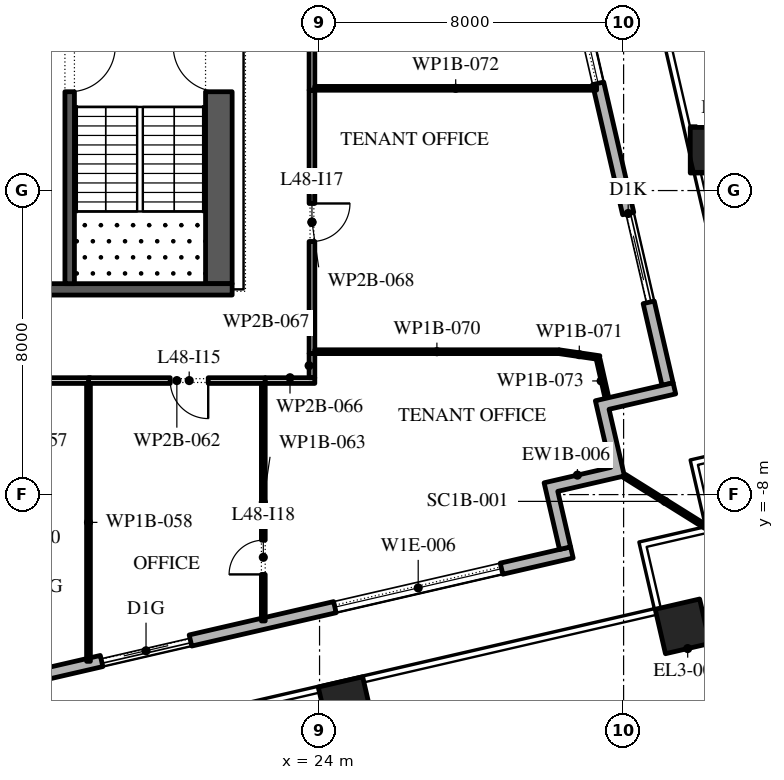
"""IFC4 building model, lengths in metres.
Left out: names, types, materials, properties, quantities, classifications, styles, units other than length and angle.
Written with IfcOpenShell. Run it as: python <this file> out.ifc"""

import sys

from ifc_helpers import new_model, si_unit, direction, frame, frame_2d, origin, origin_2d, place, context, subcontext, project, spatial, polyline, rectangle, outline, extrude, element, fill, save


model = new_model("IFC4")
c1 = context("Model", 3, precision=1e-05, world=origin(), true_north=direction((0.0, 1.0)))
c2 = subcontext(c1, "Body", "Model", "MODEL_VIEW")
j1 = project(units=[si_unit("LENGTHUNIT", "METRE"), si_unit("PLANEANGLEUNIT", "RADIAN")], contexts=[c1])
p1 = place(None, origin())
s1 = spatial("IfcSite", under=j1, at=p1, CompositionType="ELEMENT")
p2 = place(p1, origin())
s2 = spatial("IfcBuilding", under=s1, at=p2, CompositionType="ELEMENT")
p3 = place(p2, frame((0.0, 0.0, 217.8)))
s3 = spatial("IfcBuildingStorey", under=s2, at=p3, CompositionType="ELEMENT", Elevation=217.8)
for number, where, z_axis, x_axis in (
    (1, (24.685, -13.514, 0.0), (0.0, 0.0, 1.0), (0.974, 0.225, 0.0)),
    (2, (33.551, -11.467, 0.0), (0.0, 0.0, 1.0), (0.974, 0.225, 0.0)),
):
    element("IfcColumn", number, at=place(p3, frame(where, z_axis=z_axis, x_axis=x_axis)), inside=s3, PredefinedType="COLUMN", context=c2, shape_type="SweptSolid", body=[
        extrude(rectangle(XDim=1.2, YDim=1.2, at=origin_2d()), origin(), (0.0, 0.0, 1.0), 4.2),
    ])
p4 = place(p3, frame((34.354, 1.061, 0.0), z_axis=(-0.00267375834, 0.011741286623, 0.999927493974), x_axis=(-0.975037935076, -0.222038341651, 0.0)))
e3 = element("IfcColumn", 3, at=p4, inside=s3, PredefinedType="COLUMN", context=c2, shape_type="SweptSolid", body=[
    extrude(rectangle(XDim=1.2, YDim=1.2, at=origin_2d()), origin(), (0.0, 0.0, 1.0), 4.2),
])
p5 = place(p3, frame((-17.592, -20.657, 0.0), z_axis=(0.0, 0.0, 1.0), x_axis=(0.974370243697, 0.224950279389, 0.0)))
e4 = element("IfcWall", 4, at=p5, inside=s3, PredefinedType="STANDARD", context=c2, shape_type="SweptSolid", body=[
    extrude(rectangle(XDim=49.5, YDim=0.3, at=frame_2d((24.75, 0.0))), origin(), (0.0, 0.0, 1.0), 3.95),
])
p6 = place(p5, frame((2.8, 0.0, 0.0)))
e5 = element("IfcOpeningElement", 5, at=p6, cuts=e4, PredefinedType="OPENING", context=c2, shape_type="SweptSolid", body=[
    extrude(rectangle(XDim=2.4, YDim=2.85, at=frame_2d((1.2, 1.425))), frame((0.0, 0.16, 0.0), z_axis=(0.0, -1.0, 0.0), x_axis=(1.0, 0.0, 0.0)), (0.0, 0.0, 1.0), 0.32),
])
p7 = place(p5, frame((9.9, 0.0, 0.45)))
e6 = element("IfcOpeningElement", 6, at=p7, cuts=e4, PredefinedType="OPENING", context=c2, shape_type="SweptSolid", body=[
    extrude(rectangle(XDim=4.5, YDim=3.05, at=frame_2d((2.25, 1.525))), frame((0.0, 0.16, 0.0), z_axis=(0.0, -1.0, 0.0), x_axis=(1.0, 0.0, 0.0)), (0.0, 0.0, 1.0), 0.32),
])
p8 = place(p5, frame((18.2, 0.0, 0.45)))
e7 = element("IfcOpeningElement", 7, at=p8, cuts=e4, PredefinedType="OPENING", context=c2, shape_type="SweptSolid", body=[
    extrude(rectangle(XDim=4.5, YDim=2.625, at=frame_2d((2.25, 1.312))), frame((0.0, 0.16, 0.0), z_axis=(0.0, -1.0, 0.0), x_axis=(1.0, 0.0, 0.0)), (0.0, 0.0, 1.0), 0.32),
])
p9 = place(p5, frame((26.5, 0.0, 0.45)))
e8 = element("IfcOpeningElement", 8, at=p9, cuts=e4, PredefinedType="OPENING", context=c2, shape_type="SweptSolid", body=[
    extrude(rectangle(XDim=4.5, YDim=3.05, at=frame_2d((2.25, 1.525))), frame((0.0, 0.16, 0.0), z_axis=(0.0, -1.0, 0.0), x_axis=(1.0, 0.0, 0.0)), (0.0, 0.0, 1.0), 0.32),
])
p10 = place(p5, frame((36.8, 0.0, 0.0)))
e9 = element("IfcOpeningElement", 9, at=p10, cuts=e4, PredefinedType="OPENING", context=c2, shape_type="SweptSolid", body=[
    extrude(rectangle(XDim=2.4, YDim=3.225, at=frame_2d((1.2, 1.613))), frame((0.0, 0.16, 0.0), z_axis=(0.0, -1.0, 0.0), x_axis=(1.0, 0.0, 0.0)), (0.0, 0.0, 1.0), 0.32),
])
p11 = place(p5, frame((43.1, 0.0, 0.45)))
e10 = element("IfcOpeningElement", 10, at=p11, cuts=e4, PredefinedType="OPENING", context=c2, shape_type="SweptSolid", body=[
    extrude(rectangle(XDim=4.5, YDim=2.825, at=frame_2d((2.25, 1.413))), frame((0.0, 0.16, 0.0), z_axis=(0.0, -1.0, 0.0), x_axis=(1.0, 0.0, 0.0)), (0.0, 0.0, 1.0), 0.32),
])
p12 = place(p3, frame((33.157, -5.092, 0.0), z_axis=(0.0, 0.0, 1.0), x_axis=(-0.22494993302, 0.974370323663, 0.0)))
e11 = element("IfcWall", 11, at=p12, inside=s3, PredefinedType="STANDARD", context=c2, shape_type="SweptSolid", body=[
    extrude(rectangle(XDim=36.478, YDim=0.3, at=frame_2d((18.239, 0.0))), origin(), (0.0, 0.0, 1.0), 3.95),
])
p13 = place(p12, frame((2.207, 0.0, 0.0)))
e12 = element("IfcOpeningElement", 12, at=p13, cuts=e11, PredefinedType="OPENING", context=c2, shape_type="SweptSolid", body=[
    extrude(rectangle(XDim=2.4, YDim=3.075, at=frame_2d((1.2, 1.538))), frame((0.0, 0.16, 0.0), z_axis=(0.0, -1.0, 0.0), x_axis=(1.0, 0.0, 0.0)), (0.0, 0.0, 1.0), 0.32),
])
p14 = place(p12, frame((8.121, 0.0, 0.45)))
e13 = element("IfcOpeningElement", 13, at=p14, cuts=e11, PredefinedType="OPENING", context=c2, shape_type="SweptSolid", body=[
    extrude(rectangle(XDim=4.5, YDim=2.825, at=frame_2d((2.25, 1.413))), frame((0.0, 0.16, 0.0), z_axis=(0.0, -1.0, 0.0), x_axis=(1.0, 0.0, 0.0)), (0.0, 0.0, 1.0), 0.32),
])
p15 = place(p12, frame((15.236, 0.0, 0.45)))
e14 = element("IfcOpeningElement", 14, at=p15, cuts=e11, PredefinedType="OPENING", context=c2, shape_type="SweptSolid", body=[
    extrude(rectangle(XDim=4.5, YDim=2.825, at=frame_2d((2.25, 1.413))), frame((0.0, 0.16, 0.0), z_axis=(0.0, -1.0, 0.0), x_axis=(1.0, 0.0, 0.0)), (0.0, 0.0, 1.0), 0.32),
])
p16 = place(p12, frame((22.35, 0.0, 0.45)))
e15 = element("IfcOpeningElement", 15, at=p16, cuts=e11, PredefinedType="OPENING", context=c2, shape_type="SweptSolid", body=[
    extrude(rectangle(XDim=4.5, YDim=2.95, at=frame_2d((2.25, 1.475))), frame((0.0, 0.16, 0.0), z_axis=(0.0, -1.0, 0.0), x_axis=(1.0, 0.0, 0.0)), (0.0, 0.0, 1.0), 0.32),
])
p17 = place(p12, frame((30.514, 0.0, 0.0)))
e16 = element("IfcOpeningElement", 16, at=p17, cuts=e11, PredefinedType="OPENING", context=c2, shape_type="SweptSolid", body=[
    extrude(rectangle(XDim=2.4, YDim=3.4, at=frame_2d((1.2, 1.7))), frame((0.0, 0.16, 0.0), z_axis=(0.0, -1.0, 0.0), x_axis=(1.0, 0.0, 0.0)), (0.0, 0.0, 1.0), 0.32),
])
p18 = place(p3, origin())
e17 = element("IfcWall", 17, at=p18, inside=s3, PredefinedType="STANDARD", context=c2, shape_type="SweptSolid", body=[
    extrude(outline(polyline([(31.662, -7.285), (31.257, -5.531), (33.303, -5.058), (33.371, -5.351), (31.617, -5.756), (32.022, -7.51), (30.268, -7.914), (30.605, -9.376), (30.313, -9.443), (29.908, -7.69), (31.662, -7.285)])), origin(), (0.0, 0.0, 1.0), 3.95),
])
p19 = place(p3, frame((32.022, -7.51, -0.05), z_axis=(0.0, 0.0, 1.0), x_axis=(0.848047176257, -0.529920736377, 0.0)))
e18 = element("IfcWall", 18, at=p19, inside=s3, PredefinedType="STANDARD", context=c2, shape_type="SweptSolid", body=[
    extrude(rectangle(XDim=2.526, YDim=0.1, at=frame_2d((1.263, 0.0))), origin(), (0.0, 0.0, 1.0), 4.0),
])
p20 = place(p3, frame((21.35, -2.45, 0.0), z_axis=(0.0, 0.0, 1.0), x_axis=(0.0, 1.0, 0.0)))
e19 = element("IfcWall", 19, at=p20, inside=s3, PredefinedType="SHEAR", context=c2, shape_type="SweptSolid", body=[
    extrude(rectangle(XDim=27.9, YDim=0.7, at=frame_2d((13.95, 0.0))), origin(), (0.0, 0.0, 1.0), 3.95),
])
p21 = place(p20, frame((5.05, 0.0, 0.0)))
e20 = element("IfcOpeningElement", 20, at=p21, cuts=e19, PredefinedType="OPENING", context=c2, shape_type="SweptSolid", body=[
    extrude(rectangle(XDim=1.2, YDim=2.1, at=frame_2d((0.6, 1.05))), frame((0.0, 0.36, 0.0), z_axis=(0.0, -1.0, 0.0), x_axis=(1.0, 0.0, 0.0)), (0.0, 0.0, 1.0), 0.72),
])
p22 = place(p20, frame((21.65, 0.0, 0.0)))
e21 = element("IfcOpeningElement", 21, at=p22, cuts=e19, PredefinedType="OPENING", context=c2, shape_type="SweptSolid", body=[
    extrude(rectangle(XDim=1.2, YDim=2.1, at=frame_2d((0.6, 1.05))), frame((0.0, 0.36, 0.0), z_axis=(0.0, -1.0, 0.0), x_axis=(1.0, 0.0, 0.0)), (0.0, 0.0, 1.0), 0.72),
])
p23 = place(p3, frame((10.3, -2.6, 0.0), z_axis=(0.0, 0.0, 1.0), x_axis=(1.0, 0.0, 0.0)))
e22 = element("IfcWall", 22, at=p23, inside=s3, PredefinedType="SHEAR", context=c2, shape_type="SweptSolid", body=[
    extrude(rectangle(XDim=11.4, YDim=0.3, at=frame_2d((5.7, 0.0))), origin(), (0.0, 0.0, 1.0), 3.95),
])
p24 = place(p3, frame((17.425, -2.45, 0.0), z_axis=(0.0, 0.0, 1.0), x_axis=(0.0, 1.0, 0.0)))
e23 = element("IfcWall", 23, at=p24, inside=s3, PredefinedType="SHEAR", context=c2, shape_type="SweptSolid", body=[
    extrude(rectangle(XDim=6.3, YDim=0.25, at=frame_2d((3.15, 0.0))), origin(), (0.0, 0.0, 1.0), 3.95),
])
p25 = place(p24, frame((5.05, 0.0, 0.0)))
e24 = element("IfcOpeningElement", 24, at=p25, cuts=e23, PredefinedType="OPENING", context=c2, shape_type="SweptSolid", body=[
    extrude(rectangle(XDim=1.2, YDim=2.1, at=frame_2d((0.6, 1.05))), frame((0.0, 0.135, 0.0), z_axis=(0.0, -1.0, 0.0), x_axis=(1.0, 0.0, 0.0)), (0.0, 0.0, 1.0), 0.27),
])
p26 = place(p3, frame((17.97, -5.0, 0.0), z_axis=(0.0, 0.0, 1.0), x_axis=(-1.0, 0.0, 0.0)))
e25 = element("IfcWall", 25, at=p26, inside=s3, PredefinedType="PARTITIONING", context=c2, shape_type="SweptSolid", body=[
    extrude(rectangle(XDim=3.49, YDim=0.15, at=frame_2d((1.745, 0.0))), origin(), (0.0, 0.0, 1.0), 3.95),
])
p27 = place(p26, frame((1.39, 0.0, 0.0)))
e26 = element("IfcOpeningElement", 26, at=p27, cuts=e25, PredefinedType="OPENING", context=c2, shape_type="SweptSolid", body=[
    extrude(rectangle(XDim=1.0, YDim=2.1, at=frame_2d((0.5, 1.05))), frame((0.0, 0.085, 0.0), z_axis=(0.0, -1.0, 0.0), x_axis=(1.0, 0.0, 0.0)), (0.0, 0.0, 1.0), 0.17),
])
p28 = place(p3, frame((17.92, -5.075, 0.0), z_axis=(0.0, 0.0, 1.0), x_axis=(0.0, -1.0, 0.0)))
e27 = element("IfcWall", 27, at=p28, inside=s3, PredefinedType="PARTITIONING", context=c2, shape_type="SweptSolid", body=[
    extrude(rectangle(XDim=7.312, YDim=0.1, at=frame_2d((3.656, 0.0))), origin(), (0.0, 0.0, 1.0), 3.95),
])
p29 = place(p3, frame((22.57, -5.0, 0.0), z_axis=(0.0, 0.0, 1.0), x_axis=(-1.0, 0.0, 0.0)))
e28 = element("IfcWall", 28, at=p29, inside=s3, PredefinedType="PARTITIONING", context=c2, shape_type="SweptSolid", body=[
    extrude(rectangle(XDim=4.65, YDim=0.15, at=frame_2d((2.325, 0.0))), origin(), (0.0, 0.0, 1.0), 3.95),
])
p30 = place(p29, frame((1.5, 0.0, 0.0)))
e29 = element("IfcOpeningElement", 29, at=p30, cuts=e28, PredefinedType="OPENING", context=c2, shape_type="SweptSolid", body=[
    extrude(rectangle(XDim=1.0, YDim=2.1, at=frame_2d((0.5, 1.05))), frame((0.0, 0.085, 0.0), z_axis=(0.0, -1.0, 0.0), x_axis=(1.0, 0.0, 0.0)), (0.0, 0.0, 1.0), 0.17),
])
p31 = place(p3, frame((22.52, -5.075, 0.0), z_axis=(0.0, 0.0, 1.0), x_axis=(0.0, -1.0, 0.0)))
e30 = element("IfcWall", 30, at=p31, inside=s3, PredefinedType="PARTITIONING", context=c2, shape_type="SweptSolid", body=[
    extrude(rectangle(XDim=6.25, YDim=0.1, at=frame_2d((3.125, 0.0))), origin(), (0.0, 0.0, 1.0), 3.95),
])
p32 = place(p31, frame((4.125, 0.0, 0.0)))
e31 = element("IfcOpeningElement", 31, at=p32, cuts=e30, PredefinedType="OPENING", context=c2, shape_type="SweptSolid", body=[
    extrude(rectangle(XDim=0.9, YDim=2.1, at=frame_2d((0.45, 1.05))), frame((0.0, 0.06, 0.0), z_axis=(0.0, -1.0, 0.0), x_axis=(1.0, 0.0, 0.0)), (0.0, 0.0, 1.0), 0.12),
])
p33 = place(p3, frame((23.875, -5.0, 0.0), z_axis=(0.0, 0.0, 1.0), x_axis=(-1.0, 0.0, 0.0)))
e32 = element("IfcWall", 32, at=p33, inside=s3, PredefinedType="PARTITIONING", context=c2, shape_type="SweptSolid", body=[
    extrude(rectangle(XDim=1.305, YDim=0.15, at=frame_2d((0.652, 0.0))), origin(), (0.0, 0.0, 1.0), 3.95),
])
p34 = place(p3, frame((23.8, -4.29, 0.0), z_axis=(0.0, 0.0, 1.0), x_axis=(0.0, -1.0, 0.0)))
e33 = element("IfcWall", 33, at=p34, inside=s3, PredefinedType="PARTITIONING", context=c2, shape_type="SweptSolid", body=[
    extrude(rectangle(XDim=0.635, YDim=0.15, at=frame_2d((0.317, 0.0))), origin(), (0.0, 0.0, 1.0), 3.95),
])
p35 = place(p3, frame((23.8, 2.64, 0.0), z_axis=(0.0, 0.0, 1.0), x_axis=(0.0, -1.0, 0.0)))
e34 = element("IfcWall", 34, at=p35, inside=s3, PredefinedType="PARTITIONING", context=c2, shape_type="SweptSolid", body=[
    extrude(rectangle(XDim=6.93, YDim=0.15, at=frame_2d((3.465, 0.0))), origin(), (0.0, 0.0, 1.0), 3.95),
])
p36 = place(p35, frame((2.98, 0.0, 0.0)))
e35 = element("IfcOpeningElement", 35, at=p36, cuts=e34, PredefinedType="OPENING", context=c2, shape_type="SweptSolid", body=[
    extrude(rectangle(XDim=1.0, YDim=2.1, at=frame_2d((0.5, 1.05))), frame((0.0, 0.085, 0.0), z_axis=(0.0, -1.0, 0.0), x_axis=(1.0, 0.0, 0.0)), (0.0, 0.0, 1.0), 0.17),
])
p37 = place(p3, frame((23.8, 27.2, 0.0), z_axis=(0.0, 0.0, 1.0), x_axis=(0.0, -1.0, 0.0)))
e36 = element("IfcWall", 36, at=p37, inside=s3, PredefinedType="PARTITIONING", context=c2, shape_type="SweptSolid", body=[
    extrude(rectangle(XDim=24.56, YDim=0.15, at=frame_2d((12.28, 0.0))), origin(), (0.0, 0.0, 1.0), 3.95),
])
p38 = place(p37, frame((14.11, 0.0, 0.0)))
e37 = element("IfcOpeningElement", 37, at=p38, cuts=e36, PredefinedType="OPENING", context=c2, shape_type="SweptSolid", body=[
    extrude(rectangle(XDim=1.0, YDim=2.1, at=frame_2d((0.5, 1.05))), frame((0.0, 0.085, 0.0), z_axis=(0.0, -1.0, 0.0), x_axis=(1.0, 0.0, 0.0)), (0.0, 0.0, 1.0), 0.17),
])
p39 = place(p3, frame((30.3, -4.24, 0.0), z_axis=(0.0, 0.0, 1.0), x_axis=(-1.0, 0.0, 0.0)))
e38 = element("IfcWall", 38, at=p39, inside=s3, PredefinedType="PARTITIONING", context=c2, shape_type="SweptSolid", body=[
    extrude(rectangle(XDim=6.425, YDim=0.1, at=frame_2d((3.212, 0.0))), origin(), (0.0, 0.0, 1.0), 3.95),
])
p40 = place(p3, frame((31.369, -4.397, 0.0), z_axis=(0.0, 0.0, 1.0), x_axis=(-0.989385908309, 0.145311817963, 0.0)))
e39 = element("IfcWall", 39, at=p40, inside=s3, PredefinedType="PARTITIONING", context=c2, shape_type="SweptSolid", body=[
    extrude(rectangle(XDim=1.08, YDim=0.1, at=frame_2d((0.54, 0.0))), origin(), (0.0, 0.0, 1.0), 3.95),
])
p41 = place(p3, frame((31.289, 2.69, 0.0), z_axis=(0.0, 0.0, 1.0), x_axis=(-1.0, 0.0, 0.0)))
e40 = element("IfcWall", 40, at=p41, inside=s3, PredefinedType="PARTITIONING", context=c2, shape_type="SweptSolid", body=[
    extrude(rectangle(XDim=7.414, YDim=0.1, at=frame_2d((3.707, 0.0))), origin(), (0.0, 0.0, 1.0), 3.95),
])
p42 = place(p3, frame((31.584, -5.558, 0.0), z_axis=(0.0, 0.0, 1.0), x_axis=(-0.220443734992, 0.975399692281, 0.0)))
e41 = element("IfcWall", 41, at=p42, inside=s3, PredefinedType="PARTITIONING", context=c2, shape_type="SweptSolid", body=[
    extrude(rectangle(XDim=1.147, YDim=0.1, at=frame_2d((0.574, 0.0))), origin(), (0.0, 0.0, 1.0), 3.95),
])
p43 = place(p10, origin())
e42 = element("IfcDoor", 42, at=p43, inside=s3, OperationType="DOUBLE_DOOR_SLIDING", PredefinedType="DOOR", context=c2, shape_type="SweptSolid", body=[
    extrude(rectangle(XDim=2.4, YDim=3.225, at=frame_2d((1.2, 1.613))), frame((0.0, 0.025, 0.0), z_axis=(0.0, -1.0, 0.0), x_axis=(1.0, 0.0, 0.0)), (0.0, 0.0, 1.0), 0.05),
])
fill(e9, e42)
p44 = place(p11, origin())
e43 = element("IfcWindow", 43, at=p44, inside=s3, PartitioningType="DOUBLE_PANEL_VERTICAL", PredefinedType="WINDOW", context=c2, shape_type="SweptSolid", body=[
    extrude(rectangle(XDim=4.5, YDim=2.825, at=frame_2d((2.25, 1.413))), frame((0.0, 0.03, 0.0), z_axis=(0.0, -1.0, 0.0), x_axis=(1.0, 0.0, 0.0)), (0.0, 0.0, 1.0), 0.06),
])
fill(e10, e43)
p45 = place(p13, origin())
e44 = element("IfcDoor", 44, at=p45, inside=s3, OperationType="DOUBLE_DOOR_SLIDING", PredefinedType="DOOR", context=c2, shape_type="SweptSolid", body=[
    extrude(rectangle(XDim=2.4, YDim=3.075, at=frame_2d((1.2, 1.538))), frame((0.0, 0.025, 0.0), z_axis=(0.0, -1.0, 0.0), x_axis=(1.0, 0.0, 0.0)), (0.0, 0.0, 1.0), 0.05),
])
fill(e12, e44)
p46 = place(p14, origin())
e45 = element("IfcWindow", 45, at=p46, inside=s3, PartitioningType="DOUBLE_PANEL_VERTICAL", PredefinedType="WINDOW", context=c2, shape_type="SweptSolid", body=[
    extrude(rectangle(XDim=4.5, YDim=2.825, at=frame_2d((2.25, 1.413))), frame((0.0, 0.03, 0.0), z_axis=(0.0, -1.0, 0.0), x_axis=(1.0, 0.0, 0.0)), (0.0, 0.0, 1.0), 0.06),
])
fill(e13, e45)
p47 = place(p25, frame((1.2, 0.0, 0.0), z_axis=(0.0, 0.0, 1.0), x_axis=(-1.0, 0.0, 0.0)))
e46 = element("IfcDoor", 46, at=p47, inside=s3, OperationType="SINGLE_SWING_RIGHT", PredefinedType="DOOR", context=c2, shape_type="SweptSolid", body=[
    extrude(rectangle(XDim=1.2, YDim=2.1, at=frame_2d((0.6, 1.05))), frame((0.0, 0.025, 0.0), z_axis=(0.0, -1.0, 0.0), x_axis=(1.0, 0.0, 0.0)), (0.0, 0.0, 1.0), 0.05),
])
fill(e24, e46)
p48 = place(p21, origin())
e47 = element("IfcDoor", 47, at=p48, inside=s3, OperationType="SINGLE_SWING_LEFT", PredefinedType="DOOR", context=c2, shape_type="SweptSolid", body=[
    extrude(rectangle(XDim=1.2, YDim=2.1, at=frame_2d((0.6, 1.05))), frame((0.0, 0.025, 0.0), z_axis=(0.0, -1.0, 0.0), x_axis=(1.0, 0.0, 0.0)), (0.0, 0.0, 1.0), 0.05),
])
fill(e20, e47)
p49 = place(p30, origin())
e48 = element("IfcDoor", 48, at=p49, inside=s3, OperationType="SINGLE_SWING_RIGHT", PredefinedType="DOOR", context=c2, shape_type="SweptSolid", body=[
    extrude(rectangle(XDim=1.0, YDim=2.1, at=frame_2d((0.5, 1.05))), frame((0.0, 0.025, 0.0), z_axis=(0.0, -1.0, 0.0), x_axis=(1.0, 0.0, 0.0)), (0.0, 0.0, 1.0), 0.05),
])
fill(e29, e48)
p50 = place(p36, origin())
e49 = element("IfcDoor", 49, at=p50, inside=s3, OperationType="SINGLE_SWING_RIGHT", PredefinedType="DOOR", context=c2, shape_type="SweptSolid", body=[
    extrude(rectangle(XDim=1.0, YDim=2.1, at=frame_2d((0.5, 1.05))), frame((0.0, 0.025, 0.0), z_axis=(0.0, -1.0, 0.0), x_axis=(1.0, 0.0, 0.0)), (0.0, 0.0, 1.0), 0.05),
])
fill(e35, e49)
p51 = place(p32, frame((0.9, 0.0, 0.0), z_axis=(0.0, 0.0, 1.0), x_axis=(-1.0, 0.0, 0.0)))
e50 = element("IfcDoor", 50, at=p51, inside=s3, OperationType="SINGLE_SWING_RIGHT", PredefinedType="DOOR", context=c2, shape_type="SweptSolid", body=[
    extrude(rectangle(XDim=0.9, YDim=2.1, at=frame_2d((0.45, 1.05))), frame((0.0, 0.025, 0.0), z_axis=(0.0, -1.0, 0.0), x_axis=(1.0, 0.0, 0.0)), (0.0, 0.0, 1.0), 0.05),
])
fill(e31, e50)
save(model, sys.argv[1])
